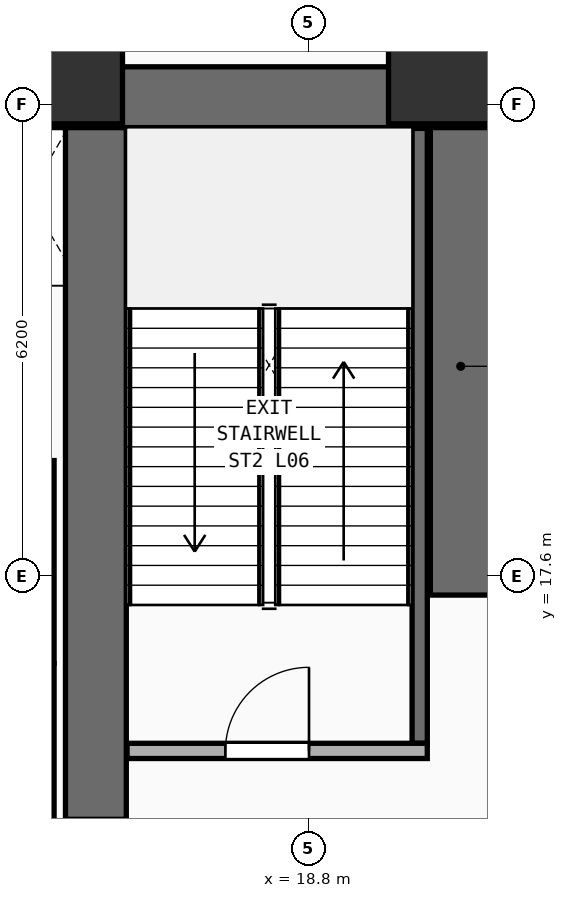
"""IFC4 building model, lengths in metres.
Left out: names, types, materials, properties, quantities, classifications, styles, units other than length and angle.
Written with IfcOpenShell. Run it as: python <this file> out.ifc"""

import sys

from ifc_helpers import new_model, si_unit, direction, frame, frame_2d, origin, origin_2d, place, context, subcontext, project, spatial, rectangle, extrude, element, fill, save


model = new_model("IFC4")
c1 = context("Model", 3, precision=1e-05, world=origin(), true_north=direction((0.0, 1.0)))
c2 = subcontext(c1, "Body", "Model", "MODEL_VIEW")
j1 = project(units=[si_unit("LENGTHUNIT", "METRE"), si_unit("PLANEANGLEUNIT", "RADIAN")], contexts=[c1])
p1 = place(None, origin())
s1 = spatial("IfcSite", under=j1, at=p1, CompositionType="ELEMENT")
p2 = place(p1, origin())
s2 = spatial("IfcBuilding", under=s1, at=p2, CompositionType="ELEMENT")
p3 = place(p2, frame((0.0, 0.0, 24.8)))
s3 = spatial("IfcBuildingStorey", under=s2, at=p3, CompositionType="ELEMENT", Elevation=24.8)
p4 = place(p3, frame((7.05, 23.9, 0.0), z_axis=(0.0, 0.0, 1.0), x_axis=(1.0, 0.0, 0.0)))
e1 = element("IfcWall", 1, at=p4, inside=s3, PredefinedType="SHEAR", context=c2, shape_type="SweptSolid", body=[
    extrude(rectangle(XDim=14.15, YDim=0.8, at=frame_2d((7.075, 0.0))), origin(), (0.0, 0.0, 1.0), 4.35),
])
p5 = place(p3, frame((20.8, 17.35, 0.0), z_axis=(0.0, 0.0, 1.0), x_axis=(0.0, 1.0, 0.0)))
e2 = element("IfcWall", 2, at=p5, inside=s3, PredefinedType="SHEAR", context=c2, shape_type="SweptSolid", body=[
    extrude(rectangle(XDim=6.15, YDim=0.8, at=frame_2d((3.075, 0.0))), origin(), (0.0, 0.0, 1.0), 4.35),
])
p6 = place(p3, frame((16.0, 14.4, 0.0), z_axis=(0.0, 0.0, 1.0), x_axis=(0.0, 1.0, 0.0)))
e3 = element("IfcWall", 3, at=p6, inside=s3, PredefinedType="SHEAR", context=c2, shape_type="SweptSolid", body=[
    extrude(rectangle(XDim=9.1, YDim=0.8, at=frame_2d((4.55, 0.0))), origin(), (0.0, 0.0, 1.0), 4.35),
])
for number, where, z_axis, x_axis in (
    (4, (15.45, 24.45, 0.0), (0.0, 0.0, 1.0), (1.0, 0.0, 0.0)),
    (5, (20.75, 24.45, 0.0), (0.0, 0.0, 1.0), (1.0, 0.0, 0.0)),
):
    element("IfcColumn", number, at=place(p3, frame(where, z_axis=z_axis, x_axis=x_axis)), inside=s3, PredefinedType="COLUMN", context=c2, shape_type="SweptSolid", body=[
        extrude(rectangle(XDim=1.8, YDim=1.8, at=origin_2d()), origin(), (0.0, 0.0, 1.0), 4.35),
    ])
p7 = place(p3, frame((20.26, 15.4, 0.0), z_axis=(0.0, 0.0, 1.0), x_axis=(0.0, 1.0, 0.0)))
e6 = element("IfcWall", 6, at=p7, inside=s3, PredefinedType="SHEAR", context=c2, shape_type="SweptSolid", body=[
    extrude(rectangle(XDim=8.09, YDim=0.2, at=frame_2d((4.045, 0.0))), origin(), (0.0, 0.0, 1.0), 4.35),
])
p8 = place(p3, frame((16.41, 15.3, 0.0), z_axis=(0.0, 0.0, 1.0), x_axis=(1.0, 0.0, 0.0)))
e7 = element("IfcWall", 7, at=p8, inside=s3, PredefinedType="PARTITIONING", context=c2, shape_type="SweptSolid", body=[
    extrude(rectangle(XDim=3.95, YDim=0.2, at=frame_2d((1.975, 0.0))), origin(), (0.0, 0.0, 1.0), 4.35),
])
p9 = place(p8, frame((1.294, 0.0, 0.0)))
e8 = element("IfcOpeningElement", 8, at=p9, cuts=e7, PredefinedType="OPENING", context=c2, shape_type="SweptSolid", body=[
    extrude(rectangle(XDim=1.1, YDim=2.2, at=frame_2d((0.55, 1.1))), frame((0.0, 0.11, 0.0), z_axis=(0.0, -1.0, 0.0), x_axis=(1.0, 0.0, 0.0)), (0.0, 0.0, 1.0), 0.22),
])
p10 = place(p3, frame((15.35, 14.22, 0.0), z_axis=(0.0, 0.0, 1.0), x_axis=(0.0, 1.0, 0.0)))
e9 = element("IfcWall", 9, at=p10, inside=s3, PredefinedType="PARTITIONING", context=c2, shape_type="SweptSolid", body=[
    extrude(rectangle(XDim=2.23, YDim=0.2, at=frame_2d((1.115, 0.0))), origin(), (0.0, 0.0, 1.0), 4.35),
])
p11 = place(p3, frame((15.35, 16.45, 0.0), z_axis=(0.0, 0.0, 1.0), x_axis=(0.0, 1.0, 0.0)))
e10 = element("IfcWall", 10, at=p11, inside=s3, PredefinedType="PARTITIONING", context=c2, shape_type="SweptSolid", body=[
    extrude(rectangle(XDim=2.67, YDim=0.2, at=frame_2d((1.335, 0.0))), origin(), (0.0, 0.0, 1.0), 4.35),
])
p12 = place(p9, origin())
e11 = element("IfcDoor", 11, at=p12, inside=s3, OperationType="SINGLE_SWING_RIGHT", PredefinedType="DOOR", context=c2, shape_type="SweptSolid", body=[
    extrude(rectangle(XDim=1.1, YDim=2.2, at=frame_2d((0.55, 1.1))), frame((0.0, 0.025, 0.0), z_axis=(0.0, -1.0, 0.0), x_axis=(1.0, 0.0, 0.0)), (0.0, 0.0, 1.0), 0.05),
])
fill(e8, e11)
save(model, sys.argv[1])
